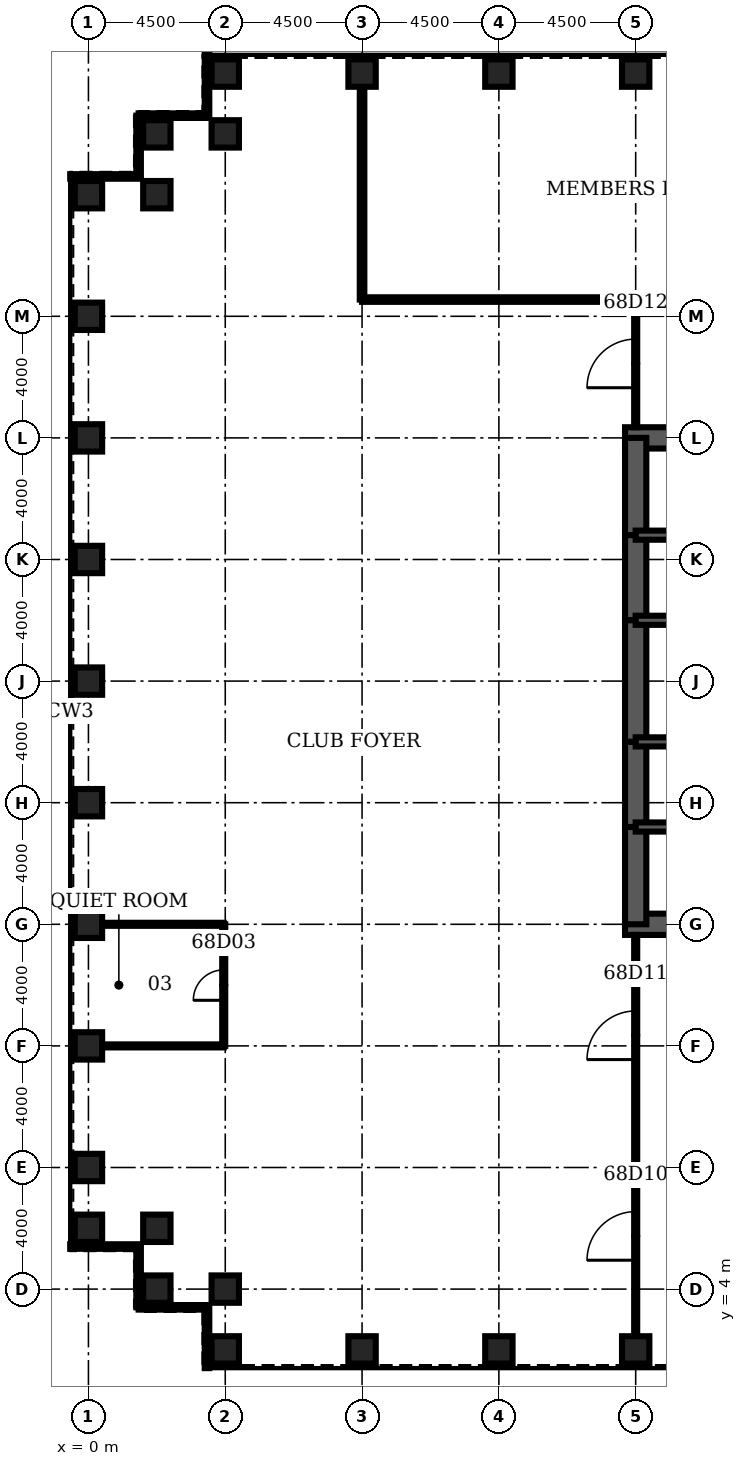
"""IFC4 building model, lengths in metres.
Left out: names, types, materials, properties, quantities, classifications, styles, units other than length and angle.
Written with IfcOpenShell. Run it as: python <this file> out.ifc"""

import sys

from ifc_helpers import new_model, si_unit, direction, frame, frame_2d, origin, origin_2d, place, context, subcontext, project, spatial, rectangle, hollow_rectangle, extrude, element, fill, save


model = new_model("IFC4")
c1 = context("Model", 3, precision=1e-05, world=origin(), true_north=direction((0.0, 1.0)))
c2 = subcontext(c1, "Body", "Model", "MODEL_VIEW")
j1 = project(units=[si_unit("LENGTHUNIT", "METRE"), si_unit("PLANEANGLEUNIT", "RADIAN")], contexts=[c1])
p1 = place(None, origin())
s1 = spatial("IfcSite", under=j1, at=p1, CompositionType="ELEMENT")
p2 = place(p1, origin())
s2 = spatial("IfcBuilding", under=s1, at=p2, CompositionType="ELEMENT")
p3 = place(p2, frame((0.0, 0.0, 300.5)))
s3 = spatial("IfcBuildingStorey", under=s2, at=p3, CompositionType="ELEMENT", Elevation=300.5)
for number, where, z_axis, x_axis in (
    (1, (4.5, 2.0, 0.0), (0.0, 0.0, 1.0), (0.0, 1.0, 0.0)),
    (2, (9.0, 2.0, 0.0), (0.0, 0.0, 1.0), (0.0, 1.0, 0.0)),
    (3, (13.5, 2.0, 0.0), (0.0, 0.0, 1.0), (0.0, 1.0, 0.0)),
    (4, (18.0, 2.0, 0.0), (0.0, 0.0, 1.0), (0.0, 1.0, 0.0)),
    (5, (18.0, 44.0, 0.0), (0.0, 0.0, 1.0), (0.0, 1.0, 0.0)),
    (6, (13.5, 44.0, 0.0), (0.0, 0.0, 1.0), (0.0, 1.0, 0.0)),
    (7, (9.0, 44.0, 0.0), (0.0, 0.0, 1.0), (0.0, 1.0, 0.0)),
    (8, (4.5, 44.0, 0.0), (0.0, 0.0, 1.0), (0.0, 1.0, 0.0)),
    (9, (4.5, 42.0, 0.0), (0.0, 0.0, 1.0), (0.0, 1.0, 0.0)),
    (10, (2.25, 42.0, 0.0), (0.0, 0.0, 1.0), (1.0, 0.0, 0.0)),
    (11, (2.25, 40.0, 0.0), (0.0, 0.0, 1.0), (1.0, 0.0, 0.0)),
    (12, (0.0, 40.0, 0.0), (0.0, 0.0, 1.0), (1.0, 0.0, 0.0)),
    (13, (0.0, 36.0, 0.0), (0.0, 0.0, 1.0), (1.0, 0.0, 0.0)),
    (14, (0.0, 32.0, 0.0), (0.0, 0.0, 1.0), (1.0, 0.0, 0.0)),
    (15, (0.0, 28.0, 0.0), (0.0, 0.0, 1.0), (1.0, 0.0, 0.0)),
    (16, (0.0, 24.0, 0.0), (0.0, 0.0, 1.0), (1.0, 0.0, 0.0)),
    (17, (0.0, 20.0, 0.0), (0.0, 0.0, 1.0), (1.0, 0.0, 0.0)),
    (18, (0.0, 16.0, 0.0), (0.0, 0.0, 1.0), (1.0, 0.0, 0.0)),
    (19, (0.0, 12.0, 0.0), (0.0, 0.0, 1.0), (1.0, 0.0, 0.0)),
    (20, (0.0, 8.0, 0.0), (0.0, 0.0, 1.0), (1.0, 0.0, 0.0)),
    (21, (0.0, 6.0, 0.0), (0.0, 0.0, 1.0), (1.0, 0.0, 0.0)),
    (22, (2.25, 6.0, 0.0), (0.0, 0.0, 1.0), (1.0, 0.0, 0.0)),
    (23, (2.25, 4.0, 0.0), (0.0, 0.0, 1.0), (1.0, 0.0, 0.0)),
    (24, (4.5, 4.0, 0.0), (0.0, 0.0, 1.0), (0.0, 1.0, 0.0)),
):
    element("IfcColumn", number, at=place(p3, frame(where, z_axis=z_axis, x_axis=x_axis)), inside=s3, PredefinedType="COLUMN", context=c2, shape_type="SweptSolid", body=[
        extrude(hollow_rectangle(XDim=0.9, YDim=0.9, WallThickness=0.06, at=origin_2d()), origin(), (0.0, 0.0, 1.0), 4.2),
    ])
for number, where, z_axis, x_axis in (
    (25, (17.65, 16.0, 0.0), (0.0, 0.0, 1.0), (1.0, 0.0, 0.0)),
    (26, (27.0, 32.0, 0.0), (0.0, 0.0, 1.0), (-1.0, 0.0, 0.0)),
):
    element("IfcWall", number, at=place(p3, frame(where, z_axis=z_axis, x_axis=x_axis)), inside=s3, PredefinedType="SHEAR", context=c2, shape_type="SweptSolid", body=[
        extrude(rectangle(XDim=9.35, YDim=0.7, at=frame_2d((4.675, 0.0))), origin(), (0.0, 0.0, 1.0), 4.2),
    ])
p4 = place(p3, frame((18.0, 32.0, 0.0), z_axis=(0.0, 0.0, 1.0), x_axis=(0.0, -1.0, 0.0)))
e27 = element("IfcWall", 27, at=p4, inside=s3, PredefinedType="SHEAR", context=c2, shape_type="SweptSolid", body=[
    extrude(rectangle(XDim=3.2, YDim=0.7, at=frame_2d((1.6, 0.0))), origin(), (0.0, 0.0, 1.0), 4.2),
])
p5 = place(p3, frame((18.0, 28.8, 0.0), z_axis=(0.0, 0.0, 1.0), x_axis=(0.0, -1.0, 0.0)))
e28 = element("IfcWall", 28, at=p5, inside=s3, PredefinedType="SHEAR", context=c2, shape_type="SweptSolid", body=[
    extrude(rectangle(XDim=2.8, YDim=0.7, at=frame_2d((1.4, 0.0))), origin(), (0.0, 0.0, 1.0), 4.2),
])
p6 = place(p5, frame((0.4, 0.0, 0.0)))
e29 = element("IfcOpeningElement", 29, at=p6, cuts=e28, PredefinedType="OPENING", context=c2, shape_type="SweptSolid", body=[
    extrude(rectangle(XDim=1.8, YDim=2.1, at=frame_2d((0.9, 1.05))), frame((0.0, 0.36, 0.0), z_axis=(0.0, -1.0, 0.0), x_axis=(1.0, 0.0, 0.0)), (0.0, 0.0, 1.0), 0.72),
])
p7 = place(p3, frame((18.0, 26.0, 0.0), z_axis=(0.0, 0.0, 1.0), x_axis=(0.0, -1.0, 0.0)))
e30 = element("IfcWall", 30, at=p7, inside=s3, PredefinedType="SHEAR", context=c2, shape_type="SweptSolid", body=[
    extrude(rectangle(XDim=4.0, YDim=0.7, at=frame_2d((2.0, 0.0))), origin(), (0.0, 0.0, 1.0), 4.2),
])
p8 = place(p3, frame((18.0, 22.0, 0.0), z_axis=(0.0, 0.0, 1.0), x_axis=(0.0, -1.0, 0.0)))
e31 = element("IfcWall", 31, at=p8, inside=s3, PredefinedType="SHEAR", context=c2, shape_type="SweptSolid", body=[
    extrude(rectangle(XDim=2.8, YDim=0.7, at=frame_2d((1.4, 0.0))), origin(), (0.0, 0.0, 1.0), 4.2),
])
p9 = place(p8, frame((0.6, 0.0, 0.0)))
e32 = element("IfcOpeningElement", 32, at=p9, cuts=e31, PredefinedType="OPENING", context=c2, shape_type="SweptSolid", body=[
    extrude(rectangle(XDim=1.8, YDim=2.1, at=frame_2d((0.9, 1.05))), frame((0.0, 0.36, 0.0), z_axis=(0.0, -1.0, 0.0), x_axis=(1.0, 0.0, 0.0)), (0.0, 0.0, 1.0), 0.72),
])
p10 = place(p3, frame((18.0, 19.2, 0.0), z_axis=(0.0, 0.0, 1.0), x_axis=(0.0, -1.0, 0.0)))
e33 = element("IfcWall", 33, at=p10, inside=s3, PredefinedType="SHEAR", context=c2, shape_type="SweptSolid", body=[
    extrude(rectangle(XDim=3.2, YDim=0.7, at=frame_2d((1.6, 0.0))), origin(), (0.0, 0.0, 1.0), 4.2),
])
p11 = place(p3, frame((18.0, 19.2, 0.0), z_axis=(0.0, 0.0, 1.0), x_axis=(1.0, 0.0, 0.0)))
e34 = element("IfcWall", 34, at=p11, inside=s3, PredefinedType="SOLIDWALL", context=c2, shape_type="SweptSolid", body=[
    extrude(rectangle(XDim=9.0, YDim=0.3, at=frame_2d((4.5, 0.0))), origin(), (0.0, 0.0, 1.0), 4.2),
])
p12 = place(p11, frame((0.65, 0.0, 0.0)))
e35 = element("IfcOpeningElement", 35, at=p12, cuts=e34, PredefinedType="OPENING", context=c2, shape_type="SweptSolid", body=[
    extrude(rectangle(XDim=1.0, YDim=2.1, at=frame_2d((0.5, 1.05))), frame((0.0, 0.16, 0.0), z_axis=(0.0, -1.0, 0.0), x_axis=(1.0, 0.0, 0.0)), (0.0, 0.0, 1.0), 0.32),
])
p13 = place(p3, frame((18.0, 28.8, 0.0), z_axis=(0.0, 0.0, 1.0), x_axis=(1.0, 0.0, 0.0)))
e36 = element("IfcWall", 36, at=p13, inside=s3, PredefinedType="SOLIDWALL", context=c2, shape_type="SweptSolid", body=[
    extrude(rectangle(XDim=9.0, YDim=0.3, at=frame_2d((4.5, 0.0))), origin(), (0.0, 0.0, 1.0), 4.2),
])
p14 = place(p13, frame((0.65, 0.0, 0.0)))
e37 = element("IfcOpeningElement", 37, at=p14, cuts=e36, PredefinedType="OPENING", context=c2, shape_type="SweptSolid", body=[
    extrude(rectangle(XDim=1.0, YDim=2.1, at=frame_2d((0.5, 1.05))), frame((0.0, 0.16, 0.0), z_axis=(0.0, -1.0, 0.0), x_axis=(1.0, 0.0, 0.0)), (0.0, 0.0, 1.0), 0.32),
])
p15 = place(p3, frame((18.0, 22.0, 0.0), z_axis=(0.0, 0.0, 1.0), x_axis=(1.0, 0.0, 0.0)))
e38 = element("IfcWall", 38, at=p15, inside=s3, PredefinedType="SOLIDWALL", context=c2, shape_type="SweptSolid", body=[
    extrude(rectangle(XDim=6.0, YDim=0.3, at=frame_2d((3.0, 0.0))), origin(), (0.0, 0.0, 1.0), 4.2),
])
p16 = place(p15, frame((4.4, 0.0, 0.0)))
e39 = element("IfcOpeningElement", 39, at=p16, cuts=e38, PredefinedType="OPENING", context=c2, shape_type="SweptSolid", body=[
    extrude(rectangle(XDim=1.0, YDim=2.1, at=frame_2d((0.5, 1.05))), frame((0.0, 0.16, 0.0), z_axis=(0.0, -1.0, 0.0), x_axis=(1.0, 0.0, 0.0)), (0.0, 0.0, 1.0), 0.32),
])
p17 = place(p15, frame((0.75, 0.0, 0.0)))
e40 = element("IfcOpeningElement", 40, at=p17, cuts=e38, PredefinedType="OPENING", context=c2, shape_type="SweptSolid", body=[
    extrude(rectangle(XDim=1.0, YDim=2.1, at=frame_2d((0.5, 1.05))), frame((0.0, 0.16, 0.0), z_axis=(0.0, -1.0, 0.0), x_axis=(1.0, 0.0, 0.0)), (0.0, 0.0, 1.0), 0.32),
])
p18 = place(p3, frame((18.0, 26.0, 0.0), z_axis=(0.0, 0.0, 1.0), x_axis=(1.0, 0.0, 0.0)))
e41 = element("IfcWall", 41, at=p18, inside=s3, PredefinedType="SOLIDWALL", context=c2, shape_type="SweptSolid", body=[
    extrude(rectangle(XDim=6.0, YDim=0.3, at=frame_2d((3.0, 0.0))), origin(), (0.0, 0.0, 1.0), 4.2),
])
for number, where, z_axis, x_axis in (
    (42, (0.45, 12.0, 0.0), (0.0, 0.0, 1.0), (1.0, 0.0, 0.0)),
    (43, (0.45, 16.0, 0.0), (0.0, 0.0, 1.0), (1.0, 0.0, 0.0)),
):
    element("IfcWall", number, at=place(p3, frame(where, z_axis=z_axis, x_axis=x_axis)), inside=s3, PredefinedType="PARTITIONING", context=c2, shape_type="SweptSolid", body=[
        extrude(rectangle(XDim=4.0, YDim=0.1, at=frame_2d((2.0, 0.0))), origin(), (0.0, 0.0, 1.0), 3.0),
    ])
p19 = place(p3, frame((9.0, 36.55, 0.0), z_axis=(0.0, 0.0, 1.0), x_axis=(1.0, 0.0, 0.0)))
e44 = element("IfcWall", 44, at=p19, inside=s3, PredefinedType="PARTITIONING", context=c2, shape_type="SweptSolid", body=[
    extrude(rectangle(XDim=22.5, YDim=0.15, at=frame_2d((11.25, 0.0))), origin(), (0.0, 0.0, 1.0), 3.0),
])
p20 = place(p19, frame((10.45, 0.0, 0.0)))
e45 = element("IfcOpeningElement", 45, at=p20, cuts=e44, PredefinedType="OPENING", context=c2, shape_type="SweptSolid", body=[
    extrude(rectangle(XDim=1.6, YDim=2.1, at=frame_2d((0.8, 1.05))), frame((0.0, 0.085, 0.0), z_axis=(0.0, -1.0, 0.0), x_axis=(1.0, 0.0, 0.0)), (0.0, 0.0, 1.0), 0.17),
])
p21 = place(p3, frame((4.45, 12.0, 0.0), z_axis=(0.0, 0.0, 1.0), x_axis=(0.0, 1.0, 0.0)))
e46 = element("IfcWall", 46, at=p21, inside=s3, PredefinedType="PARTITIONING", context=c2, shape_type="SweptSolid", body=[
    extrude(rectangle(XDim=4.0, YDim=0.1, at=frame_2d((2.0, 0.0))), origin(), (0.0, 0.0, 1.0), 3.0),
])
p22 = place(p21, frame((1.5, 0.0, 0.0)))
e47 = element("IfcOpeningElement", 47, at=p22, cuts=e46, PredefinedType="OPENING", context=c2, shape_type="SweptSolid", body=[
    extrude(rectangle(XDim=1.0, YDim=2.1, at=frame_2d((0.5, 1.05))), frame((0.0, 0.06, 0.0), z_axis=(0.0, -1.0, 0.0), x_axis=(1.0, 0.0, 0.0)), (0.0, 0.0, 1.0), 0.12),
])
p23 = place(p3, frame((9.0, 36.55, 0.0), z_axis=(0.0, 0.0, 1.0), x_axis=(0.0, 1.0, 0.0)))
e48 = element("IfcWall", 48, at=p23, inside=s3, PredefinedType="PARTITIONING", context=c2, shape_type="SweptSolid", body=[
    extrude(rectangle(XDim=7.0, YDim=0.15, at=frame_2d((3.5, 0.0))), origin(), (0.0, 0.0, 1.0), 3.0),
])
p24 = place(p3, frame((18.0, 2.45, 0.0), z_axis=(0.0, 0.0, 1.0), x_axis=(0.0, 1.0, 0.0)))
e49 = element("IfcWall", 49, at=p24, inside=s3, PredefinedType="PARTITIONING", context=c2, shape_type="SweptSolid", body=[
    extrude(rectangle(XDim=13.2, YDim=0.1, at=frame_2d((6.6, 0.0))), origin(), (0.0, 0.0, 1.0), 3.0),
])
p25 = place(p24, frame((2.5, 0.0, 0.0)))
e50 = element("IfcOpeningElement", 50, at=p25, cuts=e49, PredefinedType="OPENING", context=c2, shape_type="SweptSolid", body=[
    extrude(rectangle(XDim=1.6, YDim=2.1, at=frame_2d((0.8, 1.05))), frame((0.0, 0.06, 0.0), z_axis=(0.0, -1.0, 0.0), x_axis=(1.0, 0.0, 0.0)), (0.0, 0.0, 1.0), 0.12),
])
p26 = place(p24, frame((9.1, 0.0, 0.0)))
e51 = element("IfcOpeningElement", 51, at=p26, cuts=e49, PredefinedType="OPENING", context=c2, shape_type="SweptSolid", body=[
    extrude(rectangle(XDim=1.6, YDim=2.1, at=frame_2d((0.8, 1.05))), frame((0.0, 0.06, 0.0), z_axis=(0.0, -1.0, 0.0), x_axis=(1.0, 0.0, 0.0)), (0.0, 0.0, 1.0), 0.12),
])
p27 = place(p3, frame((18.0, 32.35, 0.0), z_axis=(0.0, 0.0, 1.0), x_axis=(0.0, 1.0, 0.0)))
e52 = element("IfcWall", 52, at=p27, inside=s3, PredefinedType="PARTITIONING", context=c2, shape_type="SweptSolid", body=[
    extrude(rectangle(XDim=4.2, YDim=0.1, at=frame_2d((2.1, 0.0))), origin(), (0.0, 0.0, 1.0), 3.0),
])
p28 = place(p27, frame((1.3, 0.0, 0.0)))
e53 = element("IfcOpeningElement", 53, at=p28, cuts=e52, PredefinedType="OPENING", context=c2, shape_type="SweptSolid", body=[
    extrude(rectangle(XDim=1.6, YDim=2.1, at=frame_2d((0.8, 1.05))), frame((0.0, 0.06, 0.0), z_axis=(0.0, -1.0, 0.0), x_axis=(1.0, 0.0, 0.0)), (0.0, 0.0, 1.0), 0.12),
])
p29 = place(p3, frame((3.9, 44.6, 0.0), z_axis=(0.0, 0.0, 1.0), x_axis=(0.0, -1.0, 0.0)))
e54 = element("IfcWall", 54, at=p29, inside=s3, PredefinedType="ELEMENTEDWALL", context=c2, shape_type="SweptSolid", body=[
    extrude(rectangle(XDim=2.0, YDim=0.15, at=frame_2d((1.0, 0.0))), origin(), (0.0, 0.0, 1.0), 4.04),
])
p30 = place(p3, frame((3.9, 42.6, 0.0), z_axis=(0.0, 0.0, 1.0), x_axis=(-1.0, 0.0, 0.0)))
e55 = element("IfcWall", 55, at=p30, inside=s3, PredefinedType="ELEMENTEDWALL", context=c2, shape_type="SweptSolid", body=[
    extrude(rectangle(XDim=2.25, YDim=0.15, at=frame_2d((1.125, 0.0))), origin(), (0.0, 0.0, 1.0), 4.04),
])
p31 = place(p3, frame((1.65, 42.6, 0.0), z_axis=(0.0, 0.0, 1.0), x_axis=(0.0, -1.0, 0.0)))
e56 = element("IfcWall", 56, at=p31, inside=s3, PredefinedType="ELEMENTEDWALL", context=c2, shape_type="SweptSolid", body=[
    extrude(rectangle(XDim=2.0, YDim=0.15, at=frame_2d((1.0, 0.0))), origin(), (0.0, 0.0, 1.0), 4.04),
])
for number, where, z_axis, x_axis in (
    (57, (1.65, 40.6, 0.0), (0.0, 0.0, 1.0), (-1.0, 0.0, 0.0)),
    (58, (-0.6, 5.4, 0.0), (0.0, 0.0, 1.0), (1.0, 0.0, 0.0)),
):
    element("IfcWall", number, at=place(p3, frame(where, z_axis=z_axis, x_axis=x_axis)), inside=s3, PredefinedType="ELEMENTEDWALL", context=c2, shape_type="SweptSolid", body=[
        extrude(rectangle(XDim=2.25, YDim=0.15, at=frame_2d((1.125, 0.0))), origin(), (0.0, 0.0, 1.0), 4.04),
    ])
p32 = place(p3, frame((1.65, 5.4, 0.0), z_axis=(0.0, 0.0, 1.0), x_axis=(0.0, -1.0, 0.0)))
e59 = element("IfcWall", 59, at=p32, inside=s3, PredefinedType="ELEMENTEDWALL", context=c2, shape_type="SweptSolid", body=[
    extrude(rectangle(XDim=2.0, YDim=0.15, at=frame_2d((1.0, 0.0))), origin(), (0.0, 0.0, 1.0), 4.04),
])
p33 = place(p3, frame((1.65, 3.4, 0.0), z_axis=(0.0, 0.0, 1.0), x_axis=(1.0, 0.0, 0.0)))
e60 = element("IfcWall", 60, at=p33, inside=s3, PredefinedType="ELEMENTEDWALL", context=c2, shape_type="SweptSolid", body=[
    extrude(rectangle(XDim=2.25, YDim=0.15, at=frame_2d((1.125, 0.0))), origin(), (0.0, 0.0, 1.0), 4.04),
])
p34 = place(p3, frame((3.9, 3.4, 0.0), z_axis=(0.0, 0.0, 1.0), x_axis=(0.0, -1.0, 0.0)))
e61 = element("IfcWall", 61, at=p34, inside=s3, PredefinedType="ELEMENTEDWALL", context=c2, shape_type="SweptSolid", body=[
    extrude(rectangle(XDim=2.0, YDim=0.15, at=frame_2d((1.0, 0.0))), origin(), (0.0, 0.0, 1.0), 4.04),
])
p35 = place(p22, origin())
e62 = element("IfcDoor", 62, at=p35, inside=s3, OperationType="SINGLE_SWING_LEFT", PredefinedType="DOOR", context=c2, shape_type="SweptSolid", body=[
    extrude(rectangle(XDim=1.0, YDim=2.1, at=frame_2d((0.5, 1.05))), frame((0.0, 0.025, 0.0), z_axis=(0.0, -1.0, 0.0), x_axis=(1.0, 0.0, 0.0)), (0.0, 0.0, 1.0), 0.05),
])
fill(e47, e62)
p36 = place(p25, origin())
e63 = element("IfcDoor", 63, at=p36, inside=s3, OperationType="SINGLE_SWING_LEFT", PredefinedType="DOOR", context=c2, shape_type="SweptSolid", body=[
    extrude(rectangle(XDim=1.6, YDim=2.1, at=frame_2d((0.8, 1.05))), frame((0.0, 0.025, 0.0), z_axis=(0.0, -1.0, 0.0), x_axis=(1.0, 0.0, 0.0)), (0.0, 0.0, 1.0), 0.05),
])
fill(e50, e63)
p37 = place(p26, origin())
e64 = element("IfcDoor", 64, at=p37, inside=s3, OperationType="SINGLE_SWING_LEFT", PredefinedType="DOOR", context=c2, shape_type="SweptSolid", body=[
    extrude(rectangle(XDim=1.6, YDim=2.1, at=frame_2d((0.8, 1.05))), frame((0.0, 0.025, 0.0), z_axis=(0.0, -1.0, 0.0), x_axis=(1.0, 0.0, 0.0)), (0.0, 0.0, 1.0), 0.05),
])
fill(e51, e64)
p38 = place(p28, origin())
e65 = element("IfcDoor", 65, at=p38, inside=s3, OperationType="SINGLE_SWING_LEFT", PredefinedType="DOOR", context=c2, shape_type="SweptSolid", body=[
    extrude(rectangle(XDim=1.6, YDim=2.1, at=frame_2d((0.8, 1.05))), frame((0.0, 0.025, 0.0), z_axis=(0.0, -1.0, 0.0), x_axis=(1.0, 0.0, 0.0)), (0.0, 0.0, 1.0), 0.05),
])
fill(e53, e65)
p39 = place(p12, origin())
e66 = element("IfcDoor", 66, at=p39, inside=s3, OperationType="SINGLE_SWING_LEFT", PredefinedType="DOOR", context=c2, shape_type="SweptSolid", body=[
    extrude(rectangle(XDim=1.0, YDim=2.1, at=frame_2d((0.5, 1.05))), frame((0.0, 0.025, 0.0), z_axis=(0.0, -1.0, 0.0), x_axis=(1.0, 0.0, 0.0)), (0.0, 0.0, 1.0), 0.05),
])
fill(e35, e66)
p40 = place(p14, origin())
e67 = element("IfcDoor", 67, at=p40, inside=s3, OperationType="SINGLE_SWING_LEFT", PredefinedType="DOOR", context=c2, shape_type="SweptSolid", body=[
    extrude(rectangle(XDim=1.0, YDim=2.1, at=frame_2d((0.5, 1.05))), frame((0.0, 0.025, 0.0), z_axis=(0.0, -1.0, 0.0), x_axis=(1.0, 0.0, 0.0)), (0.0, 0.0, 1.0), 0.05),
])
fill(e37, e67)
p41 = place(p9, origin())
e68 = element("IfcDoor", 68, at=p41, inside=s3, OperationType="SINGLE_SWING_LEFT", PredefinedType="DOOR", context=c2, shape_type="SweptSolid", body=[
    extrude(rectangle(XDim=1.8, YDim=2.1, at=frame_2d((0.9, 1.05))), frame((0.0, 0.35, 0.0), z_axis=(0.0, -1.0, 0.0), x_axis=(1.0, 0.0, 0.0)), (0.0, 0.0, 1.0), 0.699),
])
fill(e32, e68)
p42 = place(p6, origin())
e69 = element("IfcDoor", 69, at=p42, inside=s3, OperationType="SINGLE_SWING_LEFT", PredefinedType="DOOR", context=c2, shape_type="SweptSolid", body=[
    extrude(rectangle(XDim=1.8, YDim=2.1, at=frame_2d((0.9, 1.05))), frame((0.0, 0.35, 0.0), z_axis=(0.0, -1.0, 0.0), x_axis=(1.0, 0.0, 0.0)), (0.0, 0.0, 1.0), 0.699),
])
fill(e29, e69)
p43 = place(p17, origin())
e70 = element("IfcDoor", 70, at=p43, inside=s3, OperationType="SINGLE_SWING_LEFT", PredefinedType="DOOR", context=c2, shape_type="SweptSolid", body=[
    extrude(rectangle(XDim=1.0, YDim=2.1, at=frame_2d((0.5, 1.05))), frame((0.0, 0.025, 0.0), z_axis=(0.0, -1.0, 0.0), x_axis=(1.0, 0.0, 0.0)), (0.0, 0.0, 1.0), 0.05),
])
fill(e40, e70)
save(model, sys.argv[1])
